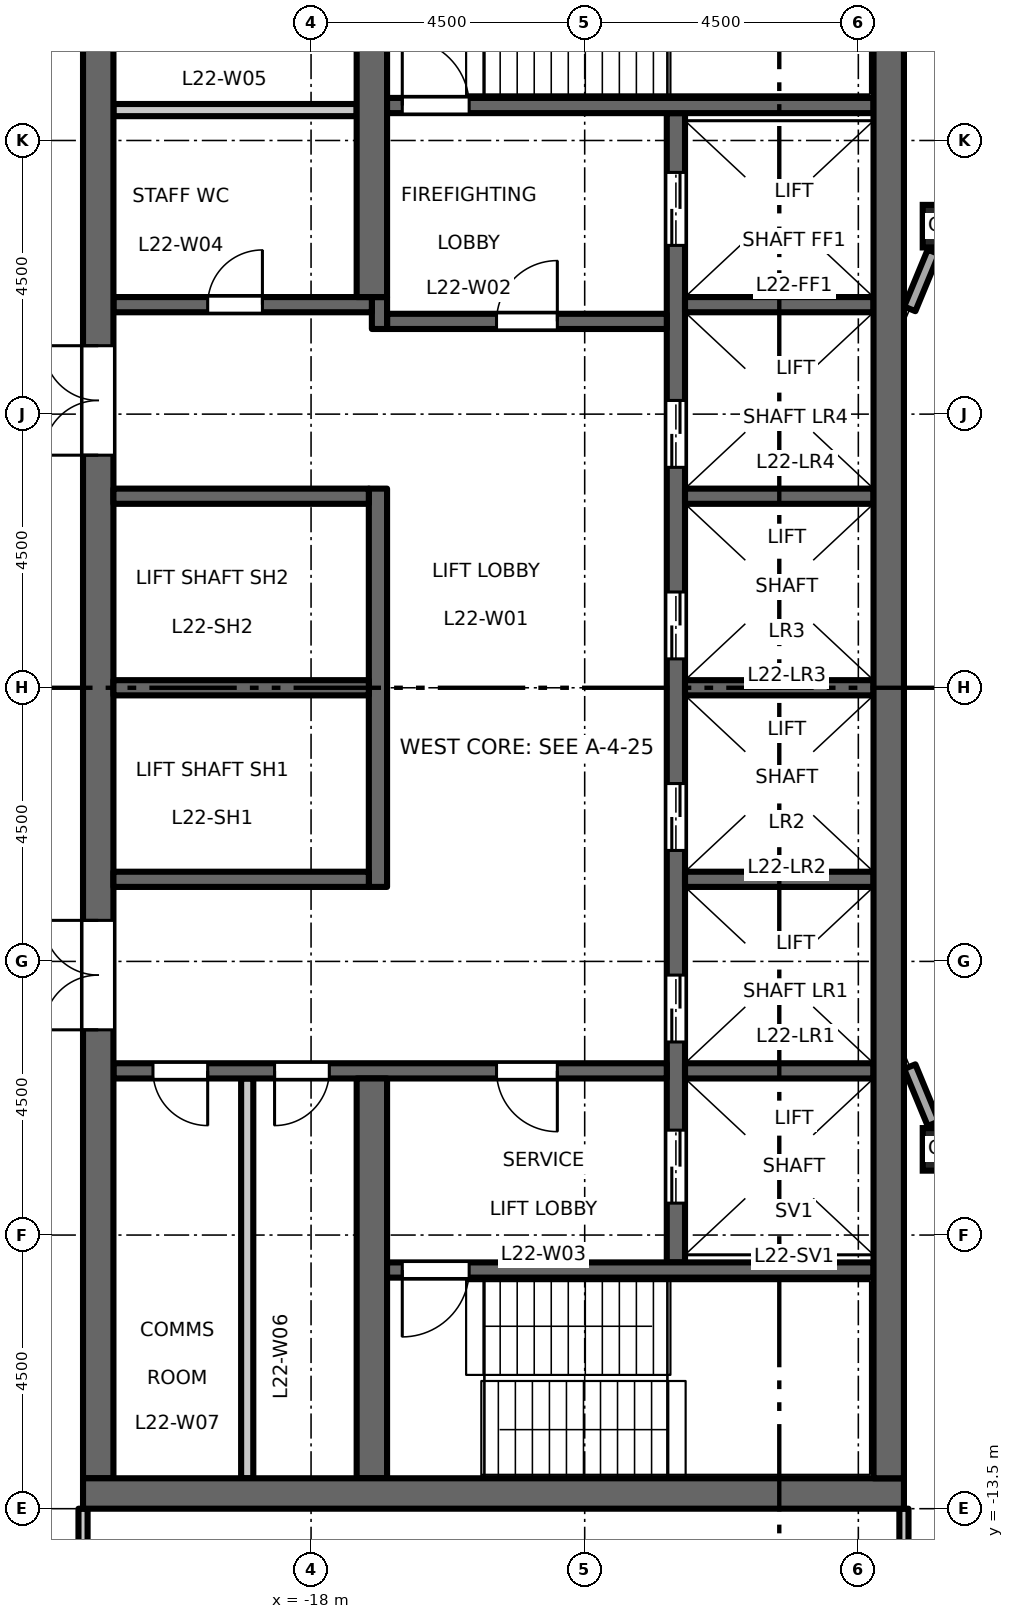
"""IFC4 building model, lengths in metres.
Left out: names, types, materials, properties, quantities, classifications, styles, units other than length and angle.
Written with IfcOpenShell. Run it as: python <this file> out.ifc"""

import sys

from ifc_helpers import new_model, si_unit, direction, frame, frame_2d, origin, origin_2d, place, context, subcontext, project, spatial, rectangle, hollow_rectangle, extrude, element, fill, save


model = new_model("IFC4")
c1 = context("Model", 3, precision=1e-05, world=origin(), true_north=direction((0.0, 1.0)))
c2 = subcontext(c1, "Body", "Model", "MODEL_VIEW")
j1 = project(units=[si_unit("LENGTHUNIT", "METRE"), si_unit("PLANEANGLEUNIT", "RADIAN")], contexts=[c1])
p1 = place(None, origin())
s1 = spatial("IfcSite", under=j1, at=p1, CompositionType="ELEMENT")
p2 = place(p1, origin())
s2 = spatial("IfcBuilding", under=s1, at=p2, CompositionType="ELEMENT")
p3 = place(p2, frame((0.0, 0.0, 104.7)))
s3 = spatial("IfcBuildingStorey", under=s2, at=p3, CompositionType="ELEMENT", Elevation=104.7)
for number, where, z_axis, x_axis in (
    (1, (-7.591, -7.591, 0.0), (0.0, 0.0, 1.0), (1.0, 0.0, 0.0)),
    (2, (-7.591, 7.591, 0.0), (0.0, 0.0, 1.0), (1.0, 0.0, 0.0)),
):
    element("IfcColumn", number, at=place(p3, frame(where, z_axis=z_axis, x_axis=x_axis)), inside=s3, PredefinedType="COLUMN", context=c2, shape_type="SweptSolid", body=[
        extrude(hollow_rectangle(XDim=0.7, YDim=0.7, WallThickness=0.04, at=origin_2d()), origin(), (0.0, 0.0, 1.0), 4.5),
    ])
p4 = place(p3, frame((-12.0, -9.45, 0.0), z_axis=(0.0, 0.0, 1.0), x_axis=(0.0, 1.0, 0.0)))
e3 = element("IfcWall", 3, at=p4, inside=s3, PredefinedType="SHEAR", context=c2, shape_type="SweptSolid", body=[
    extrude(rectangle(XDim=18.9, YDim=0.3, at=frame_2d((9.45, 0.0))), origin(), (0.0, 0.0, 1.0), 4.35),
])
p5 = place(p4, frame((3.625, 0.0, 0.0)))
e4 = element("IfcOpeningElement", 4, at=p5, cuts=e3, PredefinedType="OPENING", context=c2, shape_type="SweptSolid", body=[
    extrude(rectangle(XDim=1.1, YDim=2.1, at=frame_2d((0.55, 1.05))), frame((0.0, 0.16, 0.0), z_axis=(0.0, -1.0, 0.0), x_axis=(1.0, 0.0, 0.0)), (0.0, 0.0, 1.0), 0.32),
])
p6 = place(p4, frame((6.775, 0.0, 0.0)))
e5 = element("IfcOpeningElement", 5, at=p6, cuts=e3, PredefinedType="OPENING", context=c2, shape_type="SweptSolid", body=[
    extrude(rectangle(XDim=1.1, YDim=2.1, at=frame_2d((0.55, 1.05))), frame((0.0, 0.16, 0.0), z_axis=(0.0, -1.0, 0.0), x_axis=(1.0, 0.0, 0.0)), (0.0, 0.0, 1.0), 0.32),
])
p7 = place(p4, frame((9.925, 0.0, 0.0)))
e6 = element("IfcOpeningElement", 6, at=p7, cuts=e3, PredefinedType="OPENING", context=c2, shape_type="SweptSolid", body=[
    extrude(rectangle(XDim=1.1, YDim=2.1, at=frame_2d((0.55, 1.05))), frame((0.0, 0.16, 0.0), z_axis=(0.0, -1.0, 0.0), x_axis=(1.0, 0.0, 0.0)), (0.0, 0.0, 1.0), 0.32),
])
p8 = place(p4, frame((13.075, 0.0, 0.0)))
e7 = element("IfcOpeningElement", 7, at=p8, cuts=e3, PredefinedType="OPENING", context=c2, shape_type="SweptSolid", body=[
    extrude(rectangle(XDim=1.1, YDim=2.1, at=frame_2d((0.55, 1.05))), frame((0.0, 0.16, 0.0), z_axis=(0.0, -1.0, 0.0), x_axis=(1.0, 0.0, 0.0)), (0.0, 0.0, 1.0), 0.32),
])
p9 = place(p4, frame((16.725, 0.0, 0.0)))
e8 = element("IfcOpeningElement", 8, at=p9, cuts=e3, PredefinedType="OPENING", context=c2, shape_type="SweptSolid", body=[
    extrude(rectangle(XDim=1.2, YDim=2.1, at=frame_2d((0.6, 1.05))), frame((0.0, 0.16, 0.0), z_axis=(0.0, -1.0, 0.0), x_axis=(1.0, 0.0, 0.0)), (0.0, 0.0, 1.0), 0.32),
])
p10 = place(p4, frame((0.975, 0.0, 0.0)))
e9 = element("IfcOpeningElement", 9, at=p10, cuts=e3, PredefinedType="OPENING", context=c2, shape_type="SweptSolid", body=[
    extrude(rectangle(XDim=1.2, YDim=2.1, at=frame_2d((0.6, 1.05))), frame((0.0, 0.16, 0.0), z_axis=(0.0, -1.0, 0.0), x_axis=(1.0, 0.0, 0.0)), (0.0, 0.0, 1.0), 0.32),
])
p11 = place(p3, frame((-12.15, 6.025, 0.0), z_axis=(0.0, 0.0, 1.0), x_axis=(-1.0, 0.0, 0.0)))
e10 = element("IfcWall", 10, at=p11, inside=s3, PredefinedType="SHEAR", context=c2, shape_type="SweptSolid", body=[
    extrude(rectangle(XDim=4.6, YDim=0.25, at=frame_2d((2.3, 0.0))), origin(), (0.0, 0.0, 1.0), 4.35),
])
p12 = place(p11, frame((1.8, 0.0, 0.0)))
e11 = element("IfcOpeningElement", 11, at=p12, cuts=e10, PredefinedType="OPENING", context=c2, shape_type="SweptSolid", body=[
    extrude(rectangle(XDim=1.0, YDim=2.1, at=frame_2d((0.5, 1.05))), frame((0.0, 0.135, 0.0), z_axis=(0.0, -1.0, 0.0), x_axis=(1.0, 0.0, 0.0)), (0.0, 0.0, 1.0), 0.27),
])
p13 = place(p3, frame((-16.875, 5.9, 0.0), z_axis=(0.0, 0.0, 1.0), x_axis=(0.0, 1.0, 0.0)))
e12 = element("IfcWall", 12, at=p13, inside=s3, PredefinedType="SHEAR", context=c2, shape_type="SweptSolid", body=[
    extrude(rectangle(XDim=0.525, YDim=0.25, at=frame_2d((0.263, 0.0))), origin(), (0.0, 0.0, 1.0), 4.35),
])
p14 = place(p3, frame((-17.0, 6.3, 0.0), z_axis=(0.0, 0.0, 1.0), x_axis=(-1.0, 0.0, 0.0)))
e13 = element("IfcWall", 13, at=p14, inside=s3, PredefinedType="SHEAR", context=c2, shape_type="SweptSolid", body=[
    extrude(rectangle(XDim=4.25, YDim=0.25, at=frame_2d((2.125, 0.0))), origin(), (0.0, 0.0, 1.0), 4.35),
])
p15 = place(p14, frame((1.8, 0.0, 0.0)))
e14 = element("IfcOpeningElement", 14, at=p15, cuts=e13, PredefinedType="OPENING", context=c2, shape_type="SweptSolid", body=[
    extrude(rectangle(XDim=0.9, YDim=2.1, at=frame_2d((0.45, 1.05))), frame((0.0, 0.135, 0.0), z_axis=(0.0, -1.0, 0.0), x_axis=(1.0, 0.0, 0.0)), (0.0, 0.0, 1.0), 0.27),
])
p16 = place(p3, frame((-12.15, -6.3, 0.0), z_axis=(0.0, 0.0, 1.0), x_axis=(-1.0, 0.0, 0.0)))
e15 = element("IfcWall", 15, at=p16, inside=s3, PredefinedType="SHEAR", context=c2, shape_type="SweptSolid", body=[
    extrude(rectangle(XDim=9.1, YDim=0.25, at=frame_2d((4.55, 0.0))), origin(), (0.0, 0.0, 1.0), 4.35),
])
p17 = place(p16, frame((1.8, 0.0, 0.0)))
e16 = element("IfcOpeningElement", 16, at=p17, cuts=e15, PredefinedType="OPENING", context=c2, shape_type="SweptSolid", body=[
    extrude(rectangle(XDim=1.0, YDim=2.1, at=frame_2d((0.5, 1.05))), frame((0.0, 0.135, 0.0), z_axis=(0.0, -1.0, 0.0), x_axis=(1.0, 0.0, 0.0)), (0.0, 0.0, 1.0), 0.27),
])
p18 = place(p16, frame((5.55, 0.0, 0.0)))
e17 = element("IfcOpeningElement", 17, at=p18, cuts=e15, PredefinedType="OPENING", context=c2, shape_type="SweptSolid", body=[
    extrude(rectangle(XDim=0.9, YDim=2.1, at=frame_2d((0.45, 1.05))), frame((0.0, 0.135, 0.0), z_axis=(0.0, -1.0, 0.0), x_axis=(1.0, 0.0, 0.0)), (0.0, 0.0, 1.0), 0.27),
])
p19 = place(p16, frame((7.55, 0.0, 0.0)))
e18 = element("IfcOpeningElement", 18, at=p19, cuts=e15, PredefinedType="OPENING", context=c2, shape_type="SweptSolid", body=[
    extrude(rectangle(XDim=0.9, YDim=2.1, at=frame_2d((0.45, 1.05))), frame((0.0, 0.135, 0.0), z_axis=(0.0, -1.0, 0.0), x_axis=(1.0, 0.0, 0.0)), (0.0, 0.0, 1.0), 0.27),
])
p20 = place(p3, frame((-21.5, -13.0, 0.0), z_axis=(0.0, 0.0, 1.0), x_axis=(0.0, 1.0, 0.0)))
e19 = element("IfcWall", 19, at=p20, inside=s3, PredefinedType="SHEAR", context=c2, shape_type="SweptSolid", body=[
    extrude(rectangle(XDim=26.0, YDim=0.5, at=frame_2d((13.0, 0.0))), origin(), (0.0, 0.0, 1.0), 4.35),
])
p21 = place(p20, frame((16.825, 0.0, 0.0)))
e20 = element("IfcOpeningElement", 20, at=p21, cuts=e19, PredefinedType="OPENING", context=c2, shape_type="SweptSolid", body=[
    extrude(rectangle(XDim=1.8, YDim=2.1, at=frame_2d((0.9, 1.05))), frame((0.0, 0.26, 0.0), z_axis=(0.0, -1.0, 0.0), x_axis=(1.0, 0.0, 0.0)), (0.0, 0.0, 1.0), 0.52),
])
p22 = place(p20, frame((7.375, 0.0, 0.0)))
e21 = element("IfcOpeningElement", 21, at=p22, cuts=e19, PredefinedType="OPENING", context=c2, shape_type="SweptSolid", body=[
    extrude(rectangle(XDim=1.8, YDim=2.1, at=frame_2d((0.9, 1.05))), frame((0.0, 0.26, 0.0), z_axis=(0.0, -1.0, 0.0), x_axis=(1.0, 0.0, 0.0)), (0.0, 0.0, 1.0), 0.52),
])
p23 = place(p20, frame((23.8, 0.0, 0.0)))
e22 = element("IfcOpeningElement", 22, at=p23, cuts=e19, PredefinedType="OPENING", context=c2, shape_type="SweptSolid", body=[
    extrude(rectangle(XDim=0.9, YDim=2.1, at=frame_2d((0.45, 1.05))), frame((0.0, 0.26, 0.0), z_axis=(0.0, -1.0, 0.0), x_axis=(1.0, 0.0, 0.0)), (0.0, 0.0, 1.0), 0.52),
])
p24 = place(p3, frame((-17.25, 9.5, 0.0), z_axis=(0.0, 0.0, 1.0), x_axis=(-1.0, 0.0, 0.0)))
e23 = element("IfcWall", 23, at=p24, inside=s3, PredefinedType="PARTITIONING", context=c2, shape_type="SweptSolid", body=[
    extrude(rectangle(XDim=4.0, YDim=0.2, at=frame_2d((2.0, 0.0))), origin(), (0.0, 0.0, 1.0), 4.35),
])
p25 = place(p3, frame((-19.05, -13.0, 0.0), z_axis=(0.0, 0.0, 1.0), x_axis=(0.0, 1.0, 0.0)))
e24 = element("IfcWall", 24, at=p25, inside=s3, PredefinedType="PARTITIONING", context=c2, shape_type="SweptSolid", body=[
    extrude(rectangle(XDim=6.575, YDim=0.2, at=frame_2d((3.288, 0.0))), origin(), (0.0, 0.0, 1.0), 4.35),
])
p26 = place(p3, frame((-16.9, -3.275, 0.0), z_axis=(0.0, 0.0, 1.0), x_axis=(0.0, 1.0, 0.0)))
e25 = element("IfcWall", 25, at=p26, inside=s3, PredefinedType="SHEAR", context=c2, shape_type="SweptSolid", body=[
    extrude(rectangle(XDim=6.55, YDim=0.3, at=frame_2d((3.275, 0.0))), origin(), (0.0, 0.0, 1.0), 4.35),
])
for number, where, z_axis, x_axis in (
    (26, (-17.05, 0.0, 0.0), (0.0, 0.0, 1.0), (-1.0, 0.0, 0.0)),
    (27, (-17.05, 3.15, 0.0), (0.0, 0.0, 1.0), (-1.0, 0.0, 0.0)),
    (28, (-17.05, -3.15, 0.0), (0.0, 0.0, 1.0), (-1.0, 0.0, 0.0)),
):
    element("IfcWall", number, at=place(p3, frame(where, z_axis=z_axis, x_axis=x_axis)), inside=s3, PredefinedType="SHEAR", context=c2, shape_type="SweptSolid", body=[
        extrude(rectangle(XDim=4.2, YDim=0.25, at=frame_2d((2.1, 0.0))), origin(), (0.0, 0.0, 1.0), 4.35),
    ])
for number, where, z_axis, x_axis in (
    (29, (-17.0, 6.425, 0.0), (0.0, 0.0, 1.0), (0.0, 1.0, 0.0)),
    (30, (-17.0, -13.0, 0.0), (0.0, 0.0, 1.0), (0.0, 1.0, 0.0)),
):
    element("IfcWall", number, at=place(p3, frame(where, z_axis=z_axis, x_axis=x_axis)), inside=s3, PredefinedType="SHEAR", context=c2, shape_type="SweptSolid", body=[
        extrude(rectangle(XDim=6.575, YDim=0.5, at=frame_2d((3.288, 0.0))), origin(), (0.0, 0.0, 1.0), 4.35),
    ])
for number, where, z_axis, x_axis in (
    (31, (-8.75, 0.0, 0.0), (0.0, 0.0, 1.0), (-1.0, 0.0, 0.0)),
    (32, (-8.75, 3.15, 0.0), (0.0, 0.0, 1.0), (-1.0, 0.0, 0.0)),
    (33, (-8.75, 6.3, 0.0), (0.0, 0.0, 1.0), (-1.0, 0.0, 0.0)),
    (34, (-8.75, -3.15, 0.0), (0.0, 0.0, 1.0), (-1.0, 0.0, 0.0)),
    (35, (-8.75, -6.3, 0.0), (0.0, 0.0, 1.0), (-1.0, 0.0, 0.0)),
):
    element("IfcWall", number, at=place(p3, frame(where, z_axis=z_axis, x_axis=x_axis)), inside=s3, PredefinedType="SHEAR", context=c2, shape_type="SweptSolid", body=[
        extrude(rectangle(XDim=3.1, YDim=0.25, at=frame_2d((1.55, 0.0))), origin(), (0.0, 0.0, 1.0), 4.35),
    ])
p27 = place(p3, frame((-8.75, 9.575, 0.0), z_axis=(0.0, 0.0, 1.0), x_axis=(-1.0, 0.0, 0.0)))
e36 = element("IfcWall", 36, at=p27, inside=s3, PredefinedType="SHEAR", context=c2, shape_type="SweptSolid", body=[
    extrude(rectangle(XDim=8.0, YDim=0.25, at=frame_2d((4.0, 0.0))), origin(), (0.0, 0.0, 1.0), 4.35),
])
p28 = place(p27, frame((6.65, 0.0, 0.0)))
e37 = element("IfcOpeningElement", 37, at=p28, cuts=e36, PredefinedType="OPENING", context=c2, shape_type="SweptSolid", body=[
    extrude(rectangle(XDim=1.1, YDim=2.1, at=frame_2d((0.55, 1.05))), frame((0.0, 0.135, 0.0), z_axis=(0.0, -1.0, 0.0), x_axis=(1.0, 0.0, 0.0)), (0.0, 0.0, 1.0), 0.27),
])
p29 = place(p3, frame((-8.75, -9.575, 0.0), z_axis=(0.0, 0.0, 1.0), x_axis=(-1.0, 0.0, 0.0)))
e38 = element("IfcWall", 38, at=p29, inside=s3, PredefinedType="SHEAR", context=c2, shape_type="SweptSolid", body=[
    extrude(rectangle(XDim=8.0, YDim=0.25, at=frame_2d((4.0, 0.0))), origin(), (0.0, 0.0, 1.0), 4.35),
])
p30 = place(p29, frame((6.65, 0.0, 0.0)))
e39 = element("IfcOpeningElement", 39, at=p30, cuts=e38, PredefinedType="OPENING", context=c2, shape_type="SweptSolid", body=[
    extrude(rectangle(XDim=1.1, YDim=2.1, at=frame_2d((0.55, 1.05))), frame((0.0, 0.135, 0.0), z_axis=(0.0, -1.0, 0.0), x_axis=(1.0, 0.0, 0.0)), (0.0, 0.0, 1.0), 0.27),
])
p31 = place(p3, frame((-8.25, -13.25, 0.0), z_axis=(0.0, 0.0, 1.0), x_axis=(-1.0, 0.0, 0.0)))
e40 = element("IfcWall", 40, at=p31, inside=s3, PredefinedType="SHEAR", context=c2, shape_type="SweptSolid", body=[
    extrude(rectangle(XDim=13.5, YDim=0.5, at=frame_2d((6.75, 0.0))), origin(), (0.0, 0.0, 1.0), 4.35),
])
p32 = place(p3, frame((-8.5, -13.0, 0.0), z_axis=(0.0, 0.0, 1.0), x_axis=(0.0, 1.0, 0.0)))
e41 = element("IfcWall", 41, at=p32, inside=s3, PredefinedType="SHEAR", context=c2, shape_type="SweptSolid", body=[
    extrude(rectangle(XDim=26.0, YDim=0.5, at=frame_2d((13.0, 0.0))), origin(), (0.0, 0.0, 1.0), 4.35),
])
for number, where, z_axis, x_axis in (
    (42, (-7.766, 7.168, 0.0), (0.0, 0.0, 1.0), (-0.383, -0.924, 0.0)),
    (43, (-8.154, -6.231, 0.0), (0.0, 0.0, 1.0), (0.383, -0.924, 0.0)),
):
    element("IfcWall", number, at=place(p3, frame(where, z_axis=z_axis, x_axis=x_axis)), inside=s3, PredefinedType="STANDARD", context=c2, shape_type="SweptSolid", body=[
        extrude(rectangle(XDim=1.015, YDim=0.2, at=frame_2d((0.507, 0.0))), origin(), (0.0, 0.0, 1.0), 3.826),
    ])
for number, where, z_axis, x_axis in (
    (44, (-21.75, -16.925, 0.0), (0.0, 0.0, 1.0), (0.0, 1.0, 0.0)),
    (45, (-8.25, -16.925, 0.0), (0.0, 0.0, 1.0), (0.0, 1.0, 0.0)),
):
    element("IfcWall", number, at=place(p3, frame(where, z_axis=z_axis, x_axis=x_axis)), inside=s3, PredefinedType="PARTITIONING", context=c2, shape_type="SweptSolid", body=[
        extrude(rectangle(XDim=3.425, YDim=0.15, at=frame_2d((1.712, 0.0))), origin(), (0.0, 0.0, 1.0), 4.35),
    ])
p33 = place(p12, origin())
e46 = element("IfcDoor", 46, at=p33, inside=s3, OperationType="SINGLE_SWING_LEFT", PredefinedType="DOOR", context=c2, shape_type="SweptSolid", body=[
    extrude(rectangle(XDim=1.0, YDim=2.1, at=frame_2d((0.5, 1.05))), frame((0.0, 0.025, 0.0), z_axis=(0.0, -1.0, 0.0), x_axis=(1.0, 0.0, 0.0)), (0.0, 0.0, 1.0), 0.05),
])
fill(e11, e46)
p34 = place(p17, origin())
e47 = element("IfcDoor", 47, at=p34, inside=s3, OperationType="SINGLE_SWING_RIGHT", PredefinedType="DOOR", context=c2, shape_type="SweptSolid", body=[
    extrude(rectangle(XDim=1.0, YDim=2.1, at=frame_2d((0.5, 1.05))), frame((0.0, 0.025, 0.0), z_axis=(0.0, -1.0, 0.0), x_axis=(1.0, 0.0, 0.0)), (0.0, 0.0, 1.0), 0.05),
])
fill(e16, e47)
p35 = place(p28, origin())
e48 = element("IfcDoor", 48, at=p35, inside=s3, OperationType="SINGLE_SWING_RIGHT", PredefinedType="DOOR", context=c2, shape_type="SweptSolid", body=[
    extrude(rectangle(XDim=1.1, YDim=2.1, at=frame_2d((0.55, 1.05))), frame((0.0, 0.025, 0.0), z_axis=(0.0, -1.0, 0.0), x_axis=(1.0, 0.0, 0.0)), (0.0, 0.0, 1.0), 0.05),
])
fill(e37, e48)
p36 = place(p30, origin())
e49 = element("IfcDoor", 49, at=p36, inside=s3, OperationType="SINGLE_SWING_LEFT", PredefinedType="DOOR", context=c2, shape_type="SweptSolid", body=[
    extrude(rectangle(XDim=1.1, YDim=2.1, at=frame_2d((0.55, 1.05))), frame((0.0, 0.025, 0.0), z_axis=(0.0, -1.0, 0.0), x_axis=(1.0, 0.0, 0.0)), (0.0, 0.0, 1.0), 0.05),
])
fill(e39, e49)
p37 = place(p21, origin())
e50 = element("IfcDoor", 50, at=p37, inside=s3, OperationType="DOUBLE_DOOR_DOUBLE_SWING", PredefinedType="DOOR", context=c2, shape_type="SweptSolid", body=[
    extrude(rectangle(XDim=1.8, YDim=2.1, at=frame_2d((0.9, 1.05))), frame((0.0, 0.025, 0.0), z_axis=(0.0, -1.0, 0.0), x_axis=(1.0, 0.0, 0.0)), (0.0, 0.0, 1.0), 0.05),
])
fill(e20, e50)
p38 = place(p22, origin())
e51 = element("IfcDoor", 51, at=p38, inside=s3, OperationType="DOUBLE_DOOR_DOUBLE_SWING", PredefinedType="DOOR", context=c2, shape_type="SweptSolid", body=[
    extrude(rectangle(XDim=1.8, YDim=2.1, at=frame_2d((0.9, 1.05))), frame((0.0, 0.025, 0.0), z_axis=(0.0, -1.0, 0.0), x_axis=(1.0, 0.0, 0.0)), (0.0, 0.0, 1.0), 0.05),
])
fill(e21, e51)
p39 = place(p5, origin())
e52 = element("IfcDoor", 52, at=p39, inside=s3, OperationType="DOUBLE_DOOR_SLIDING", PredefinedType="DOOR", context=c2, shape_type="SweptSolid", body=[
    extrude(rectangle(XDim=1.1, YDim=2.1, at=frame_2d((0.55, 1.05))), frame((0.0, 0.025, 0.0), z_axis=(0.0, -1.0, 0.0), x_axis=(1.0, 0.0, 0.0)), (0.0, 0.0, 1.0), 0.05),
])
fill(e4, e52)
p40 = place(p6, origin())
e53 = element("IfcDoor", 53, at=p40, inside=s3, OperationType="DOUBLE_DOOR_SLIDING", PredefinedType="DOOR", context=c2, shape_type="SweptSolid", body=[
    extrude(rectangle(XDim=1.1, YDim=2.1, at=frame_2d((0.55, 1.05))), frame((0.0, 0.025, 0.0), z_axis=(0.0, -1.0, 0.0), x_axis=(1.0, 0.0, 0.0)), (0.0, 0.0, 1.0), 0.05),
])
fill(e5, e53)
p41 = place(p7, origin())
e54 = element("IfcDoor", 54, at=p41, inside=s3, OperationType="DOUBLE_DOOR_SLIDING", PredefinedType="DOOR", context=c2, shape_type="SweptSolid", body=[
    extrude(rectangle(XDim=1.1, YDim=2.1, at=frame_2d((0.55, 1.05))), frame((0.0, 0.025, 0.0), z_axis=(0.0, -1.0, 0.0), x_axis=(1.0, 0.0, 0.0)), (0.0, 0.0, 1.0), 0.05),
])
fill(e6, e54)
p42 = place(p8, origin())
e55 = element("IfcDoor", 55, at=p42, inside=s3, OperationType="DOUBLE_DOOR_SLIDING", PredefinedType="DOOR", context=c2, shape_type="SweptSolid", body=[
    extrude(rectangle(XDim=1.1, YDim=2.1, at=frame_2d((0.55, 1.05))), frame((0.0, 0.025, 0.0), z_axis=(0.0, -1.0, 0.0), x_axis=(1.0, 0.0, 0.0)), (0.0, 0.0, 1.0), 0.05),
])
fill(e7, e55)
p43 = place(p9, origin())
e56 = element("IfcDoor", 56, at=p43, inside=s3, OperationType="DOUBLE_DOOR_SLIDING", PredefinedType="DOOR", context=c2, shape_type="SweptSolid", body=[
    extrude(rectangle(XDim=1.2, YDim=2.1, at=frame_2d((0.6, 1.05))), frame((0.0, 0.025, 0.0), z_axis=(0.0, -1.0, 0.0), x_axis=(1.0, 0.0, 0.0)), (0.0, 0.0, 1.0), 0.05),
])
fill(e8, e56)
p44 = place(p10, origin())
e57 = element("IfcDoor", 57, at=p44, inside=s3, OperationType="DOUBLE_DOOR_SLIDING", PredefinedType="DOOR", context=c2, shape_type="SweptSolid", body=[
    extrude(rectangle(XDim=1.2, YDim=2.1, at=frame_2d((0.6, 1.05))), frame((0.0, 0.025, 0.0), z_axis=(0.0, -1.0, 0.0), x_axis=(1.0, 0.0, 0.0)), (0.0, 0.0, 1.0), 0.05),
])
fill(e9, e57)
p45 = place(p15, origin())
e58 = element("IfcDoor", 58, at=p45, inside=s3, OperationType="SINGLE_SWING_LEFT", PredefinedType="DOOR", context=c2, shape_type="SweptSolid", body=[
    extrude(rectangle(XDim=0.9, YDim=2.1, at=frame_2d((0.45, 1.05))), frame((0.0, 0.025, 0.0), z_axis=(0.0, -1.0, 0.0), x_axis=(1.0, 0.0, 0.0)), (0.0, 0.0, 1.0), 0.05),
])
fill(e14, e58)
p46 = place(p18, origin())
e59 = element("IfcDoor", 59, at=p46, inside=s3, OperationType="SINGLE_SWING_LEFT", PredefinedType="DOOR", context=c2, shape_type="SweptSolid", body=[
    extrude(rectangle(XDim=0.9, YDim=2.1, at=frame_2d((0.45, 1.05))), frame((0.0, 0.025, 0.0), z_axis=(0.0, -1.0, 0.0), x_axis=(1.0, 0.0, 0.0)), (0.0, 0.0, 1.0), 0.05),
])
fill(e17, e59)
p47 = place(p19, origin())
e60 = element("IfcDoor", 60, at=p47, inside=s3, OperationType="SINGLE_SWING_RIGHT", PredefinedType="DOOR", context=c2, shape_type="SweptSolid", body=[
    extrude(rectangle(XDim=0.9, YDim=2.1, at=frame_2d((0.45, 1.05))), frame((0.0, 0.025, 0.0), z_axis=(0.0, -1.0, 0.0), x_axis=(1.0, 0.0, 0.0)), (0.0, 0.0, 1.0), 0.05),
])
fill(e18, e60)
save(model, sys.argv[1])
